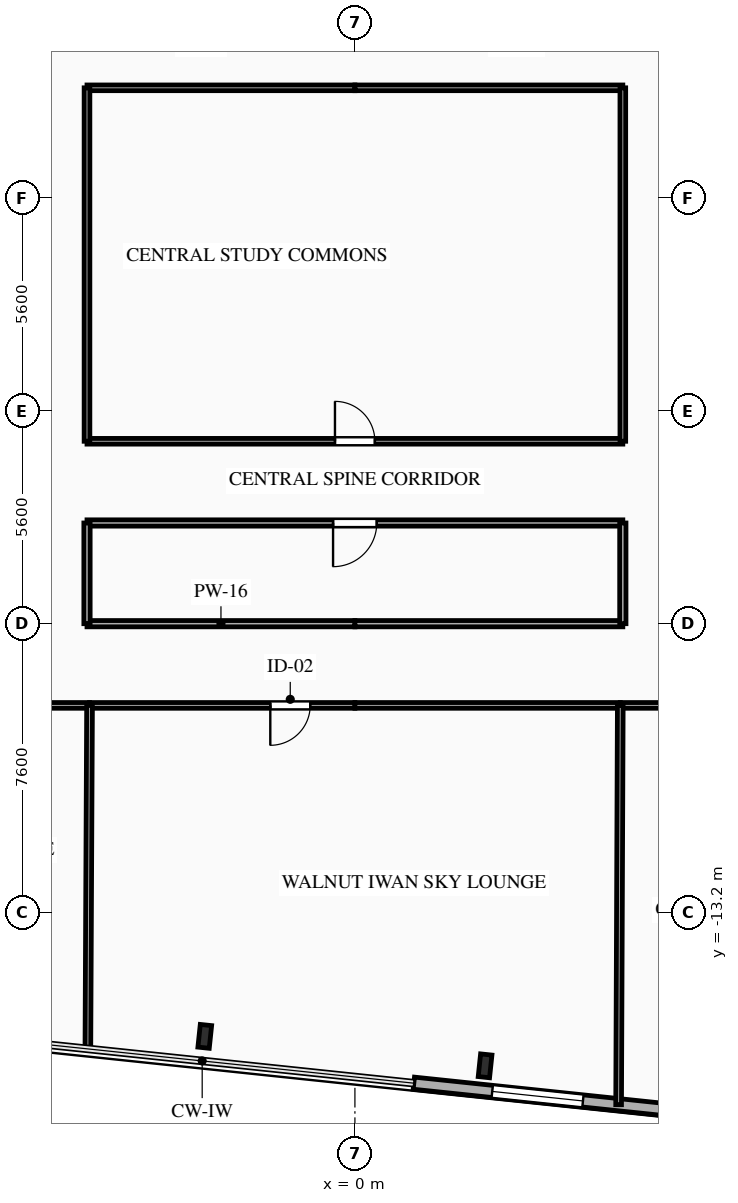
"""IFC4 building model, lengths in metres.
Left out: names, types, materials, properties, quantities, classifications, styles, units other than length and angle.
Written with IfcOpenShell. Run it as: python <this file> out.ifc"""

import sys

from ifc_helpers import new_model, si_unit, direction, frame, frame_2d, origin, origin_2d, place, context, subcontext, project, spatial, rectangle, i_section, extrude, element, fill, save


model = new_model("IFC4")
c1 = context("Model", 3, precision=1e-05, world=origin(), true_north=direction((0.0, 1.0)))
c2 = subcontext(c1, "Body", "Model", "MODEL_VIEW")
j1 = project(units=[si_unit("LENGTHUNIT", "METRE"), si_unit("PLANEANGLEUNIT", "RADIAN")], contexts=[c1])
p1 = place(None, origin())
s1 = spatial("IfcSite", under=j1, at=p1, CompositionType="ELEMENT")
p2 = place(p1, origin())
s2 = spatial("IfcBuilding", under=s1, at=p2, CompositionType="ELEMENT")
p3 = place(p2, frame((0.0, 0.0, 199.75)))
s3 = spatial("IfcBuildingStorey", under=s2, at=p3, CompositionType="ELEMENT", Elevation=199.75)
for number, where, z_axis, x_axis in (
    (1, (-3.951, -16.458, 0.0), (0.0, 0.0, 1.0), (0.995, -0.105, 0.0)),
    (2, (3.425, -17.233, 0.0), (0.0, 0.0, 1.0), (0.995, -0.105, 0.0)),
):
    element("IfcColumn", number, at=place(p3, frame(where, z_axis=z_axis, x_axis=x_axis)), inside=s3, PredefinedType="COLUMN", context=c2, shape_type="SweptSolid", body=[
        extrude(i_section(OverallWidth=0.3, OverallDepth=0.6, WebThickness=0.015, FlangeThickness=0.03, FilletRadius=0.027, at=origin_2d()), origin(), (0.0, 0.0, 1.0), 3.35),
    ])
p4 = place(p3, frame((18.756, -19.498, 0.0), z_axis=(0.0, 0.0, 1.0), x_axis=(-0.994523378108, 0.104514354977, 0.0)))
e3 = element("IfcWall", 3, at=p4, inside=s3, PredefinedType="SOLIDWALL", context=c2, shape_type="SweptSolid", body=[
    extrude(rectangle(XDim=17.3, YDim=0.32, at=frame_2d((8.65, 0.0))), origin(), (0.0, 0.0, 1.0), 3.04),
])
p5 = place(p4, frame((1.858, 0.0, 0.85)))
e4 = element("IfcOpeningElement", 4, at=p5, cuts=e3, PredefinedType="OPENING", context=c2, shape_type="SweptSolid", body=[
    extrude(rectangle(XDim=1.65, YDim=1.85, at=frame_2d((0.825, 0.925))), frame((0.0, 0.17, 0.0), z_axis=(0.0, -1.0, 0.0), x_axis=(1.0, 0.0, 0.0)), (0.0, 0.0, 1.0), 0.34),
])
p6 = place(p4, frame((8.26, 0.0, 0.85)))
e5 = element("IfcOpeningElement", 5, at=p6, cuts=e3, PredefinedType="OPENING", context=c2, shape_type="SweptSolid", body=[
    extrude(rectangle(XDim=1.65, YDim=1.85, at=frame_2d((0.825, 0.925))), frame((0.0, 0.17, 0.0), z_axis=(0.0, -1.0, 0.0), x_axis=(1.0, 0.0, 0.0)), (0.0, 0.0, 1.0), 0.34),
])
p7 = place(p4, frame((12.825, 0.0, 0.85)))
e6 = element("IfcOpeningElement", 6, at=p7, cuts=e3, PredefinedType="OPENING", context=c2, shape_type="SweptSolid", body=[
    extrude(rectangle(XDim=2.4, YDim=1.95, at=frame_2d((1.2, 0.975))), frame((0.0, 0.17, 0.0), z_axis=(0.0, -1.0, 0.0), x_axis=(1.0, 0.0, 0.0)), (0.0, 0.0, 1.0), 0.34),
])
for number, where, z_axis, x_axis in (
    (7, (0.0, 8.5, 0.0), (0.0, 0.0, 1.0), (-1.0, 0.0, 0.0)),
    (8, (7.05, 8.5, 0.0), (0.0, 0.0, 1.0), (-1.0, 0.0, 0.0)),
):
    element("IfcWall", number, at=place(p3, frame(where, z_axis=z_axis, x_axis=x_axis)), inside=s3, PredefinedType="PARTITIONING", context=c2, shape_type="SweptSolid", body=[
        extrude(rectangle(XDim=7.05, YDim=0.15, at=frame_2d((3.525, 0.0))), origin(), (0.0, 0.0, 1.0), 3.04),
    ])
p8 = place(p3, frame((-6.983, -7.75, 0.0), z_axis=(0.0, 0.0, 1.0), x_axis=(-1.0, 0.0, 0.0)))
e9 = element("IfcWall", 9, at=p8, inside=s3, PredefinedType="PARTITIONING", context=c2, shape_type="SweptSolid", body=[
    extrude(rectangle(XDim=13.967, YDim=0.15, at=frame_2d((6.983, 0.0))), origin(), (0.0, 0.0, 1.0), 3.04),
])
p9 = place(p8, frame((6.458, 0.0, 0.0)))
e10 = element("IfcOpeningElement", 10, at=p9, cuts=e9, PredefinedType="OPENING", context=c2, shape_type="SweptSolid", body=[
    extrude(rectangle(XDim=1.05, YDim=2.15, at=frame_2d((0.525, 1.075))), frame((0.0, 0.085, 0.0), z_axis=(0.0, -1.0, 0.0), x_axis=(1.0, 0.0, 0.0)), (0.0, 0.0, 1.0), 0.17),
])
p10 = place(p3, frame((0.0, -7.75, 0.0), z_axis=(0.0, 0.0, 1.0), x_axis=(-1.0, 0.0, 0.0)))
e11 = element("IfcWall", 11, at=p10, inside=s3, PredefinedType="PARTITIONING", context=c2, shape_type="SweptSolid", body=[
    extrude(rectangle(XDim=6.983, YDim=0.15, at=frame_2d((3.491, 0.0))), origin(), (0.0, 0.0, 1.0), 3.04),
])
p11 = place(p10, frame((1.177, 0.0, 0.0)))
e12 = element("IfcOpeningElement", 12, at=p11, cuts=e11, PredefinedType="OPENING", context=c2, shape_type="SweptSolid", body=[
    extrude(rectangle(XDim=1.05, YDim=2.15, at=frame_2d((0.525, 1.075))), frame((0.0, 0.085, 0.0), z_axis=(0.0, -1.0, 0.0), x_axis=(1.0, 0.0, 0.0)), (0.0, 0.0, 1.0), 0.17),
])
p12 = place(p3, frame((-7.05, -5.6, 0.0), z_axis=(0.0, 0.0, 1.0), x_axis=(1.0, 0.0, 0.0)))
e13 = element("IfcWall", 13, at=p12, inside=s3, PredefinedType="PARTITIONING", context=c2, shape_type="SweptSolid", body=[
    extrude(rectangle(XDim=7.05, YDim=0.165, at=frame_2d((3.525, 0.0))), origin(), (0.0, 0.0, 1.0), 2.525),
])
p13 = place(p3, frame((6.983, -7.75, 0.0), z_axis=(0.0, 0.0, 1.0), x_axis=(-1.0, 0.0, 0.0)))
e14 = element("IfcWall", 14, at=p13, inside=s3, PredefinedType="PARTITIONING", context=c2, shape_type="SweptSolid", body=[
    extrude(rectangle(XDim=6.983, YDim=0.15, at=frame_2d((3.491, 0.0))), origin(), (0.0, 0.0, 1.0), 3.04),
])
p14 = place(p3, frame((13.967, -7.75, 0.0), z_axis=(0.0, 0.0, 1.0), x_axis=(-1.0, 0.0, 0.0)))
e15 = element("IfcWall", 15, at=p14, inside=s3, PredefinedType="PARTITIONING", context=c2, shape_type="SweptSolid", body=[
    extrude(rectangle(XDim=6.984, YDim=0.15, at=frame_2d((3.492, 0.0))), origin(), (0.0, 0.0, 1.0), 3.04),
])
p15 = place(p14, frame((1.177, 0.0, 0.0)))
e16 = element("IfcOpeningElement", 16, at=p15, cuts=e15, PredefinedType="OPENING", context=c2, shape_type="SweptSolid", body=[
    extrude(rectangle(XDim=1.05, YDim=2.15, at=frame_2d((0.525, 1.075))), frame((0.0, 0.085, 0.0), z_axis=(0.0, -1.0, 0.0), x_axis=(1.0, 0.0, 0.0)), (0.0, 0.0, 1.0), 0.17),
])
p16 = place(p3, frame((0.0, -5.6, 0.0), z_axis=(0.0, 0.0, 1.0), x_axis=(1.0, 0.0, 0.0)))
e17 = element("IfcWall", 17, at=p16, inside=s3, PredefinedType="PARTITIONING", context=c2, shape_type="SweptSolid", body=[
    extrude(rectangle(XDim=7.05, YDim=0.165, at=frame_2d((3.525, 0.0))), origin(), (0.0, 0.0, 1.0), 2.525),
])
p17 = place(p3, frame((-7.05, -0.8, 0.0), z_axis=(0.0, 0.0, 1.0), x_axis=(1.0, 0.0, 0.0)))
e18 = element("IfcWall", 18, at=p17, inside=s3, PredefinedType="PARTITIONING", context=c2, shape_type="SweptSolid", body=[
    extrude(rectangle(XDim=14.1, YDim=0.15, at=frame_2d((7.05, 0.0))), origin(), (0.0, 0.0, 1.0), 3.04),
])
p18 = place(p17, frame((6.525, 0.0, 0.0)))
e19 = element("IfcOpeningElement", 19, at=p18, cuts=e18, PredefinedType="OPENING", context=c2, shape_type="SweptSolid", body=[
    extrude(rectangle(XDim=1.05, YDim=2.15, at=frame_2d((0.525, 1.075))), frame((0.0, 0.085, 0.0), z_axis=(0.0, -1.0, 0.0), x_axis=(1.0, 0.0, 0.0)), (0.0, 0.0, 1.0), 0.17),
])
p19 = place(p3, frame((7.05, -2.95, 0.0), z_axis=(0.0, 0.0, 1.0), x_axis=(-1.0, 0.0, 0.0)))
e20 = element("IfcWall", 20, at=p19, inside=s3, PredefinedType="PARTITIONING", context=c2, shape_type="SweptSolid", body=[
    extrude(rectangle(XDim=14.1, YDim=0.165, at=frame_2d((7.05, 0.0))), origin(), (0.0, 0.0, 1.0), 3.04),
])
p20 = place(p19, frame((6.475, 0.0, 0.0)))
e21 = element("IfcOpeningElement", 21, at=p20, cuts=e20, PredefinedType="OPENING", context=c2, shape_type="SweptSolid", body=[
    extrude(rectangle(XDim=1.15, YDim=2.15, at=frame_2d((0.575, 1.075))), frame((0.0, 0.093, 0.0), z_axis=(0.0, -1.0, 0.0), x_axis=(1.0, 0.0, 0.0)), (0.0, 0.0, 1.0), 0.185),
])
p21 = place(p3, frame((-7.05, 8.5, 0.0), z_axis=(0.0, 0.0, 1.0), x_axis=(0.0, -1.0, 0.0)))
e22 = element("IfcWall", 22, at=p21, inside=s3, PredefinedType="PARTITIONING", context=c2, shape_type="SweptSolid", body=[
    extrude(rectangle(XDim=9.3, YDim=0.15, at=frame_2d((4.65, 0.0))), origin(), (0.0, 0.0, 1.0), 3.04),
])
p22 = place(p3, frame((-7.05, -2.95, 0.0), z_axis=(0.0, 0.0, 1.0), x_axis=(0.0, -1.0, 0.0)))
e23 = element("IfcWall", 23, at=p22, inside=s3, PredefinedType="PARTITIONING", context=c2, shape_type="SweptSolid", body=[
    extrude(rectangle(XDim=2.65, YDim=0.165, at=frame_2d((1.325, 0.0))), origin(), (0.0, 0.0, 1.0), 3.04),
])
p23 = place(p3, frame((7.05, -0.8, 0.0), z_axis=(0.0, 0.0, 1.0), x_axis=(0.0, 1.0, 0.0)))
e24 = element("IfcWall", 24, at=p23, inside=s3, PredefinedType="PARTITIONING", context=c2, shape_type="SweptSolid", body=[
    extrude(rectangle(XDim=9.3, YDim=0.15, at=frame_2d((4.65, 0.0))), origin(), (0.0, 0.0, 1.0), 3.04),
])
p24 = place(p3, frame((7.05, -5.6, 0.0), z_axis=(0.0, 0.0, 1.0), x_axis=(0.0, 1.0, 0.0)))
e25 = element("IfcWall", 25, at=p24, inside=s3, PredefinedType="PARTITIONING", context=c2, shape_type="SweptSolid", body=[
    extrude(rectangle(XDim=2.65, YDim=0.165, at=frame_2d((1.325, 0.0))), origin(), (0.0, 0.0, 1.0), 3.04),
])
p25 = place(p3, frame((-6.983, -7.75, 0.0), z_axis=(0.0, 0.0, 1.0), x_axis=(-0.004861916497, -0.999988180814, 0.0)))
e26 = element("IfcWall", 26, at=p25, inside=s3, PredefinedType="PARTITIONING", context=c2, shape_type="SweptSolid", body=[
    extrude(rectangle(XDim=9.039, YDim=0.15, at=frame_2d((4.519, 0.0))), origin(), (0.0, 0.0, 1.0), 3.04),
])
p26 = place(p3, frame((6.983, -7.75, 0.0), z_axis=(0.0, 0.0, 1.0), x_axis=(-0.004159465807, -0.999991349385, 0.0)))
e27 = element("IfcWall", 27, at=p26, inside=s3, PredefinedType="PARTITIONING", context=c2, shape_type="SweptSolid", body=[
    extrude(rectangle(XDim=10.506, YDim=0.15, at=frame_2d((5.253, 0.0))), origin(), (0.0, 0.0, 1.0), 3.04),
])
p27 = place(p7, origin())
e28 = element("IfcWindow", 28, at=p27, inside=s3, PartitioningType="SINGLE_PANEL", PredefinedType="WINDOW", context=c2, shape_type="SweptSolid", body=[
    extrude(rectangle(XDim=2.4, YDim=1.95, at=frame_2d((1.2, 0.975))), frame((0.0, 0.03, 0.0), z_axis=(0.0, -1.0, 0.0), x_axis=(1.0, 0.0, 0.0)), (0.0, 0.0, 1.0), 0.06),
])
fill(e6, e28)
p28 = place(p11, origin())
e29 = element("IfcDoor", 29, at=p28, inside=s3, OperationType="SINGLE_SWING_RIGHT", PredefinedType="DOOR", context=c2, shape_type="SweptSolid", body=[
    extrude(rectangle(XDim=1.05, YDim=2.15, at=frame_2d((0.525, 1.075))), frame((0.0, 0.025, 0.0), z_axis=(0.0, -1.0, 0.0), x_axis=(1.0, 0.0, 0.0)), (0.0, 0.0, 1.0), 0.05),
])
fill(e12, e29)
p29 = place(p18, origin())
e30 = element("IfcDoor", 30, at=p29, inside=s3, OperationType="SINGLE_SWING_LEFT", PredefinedType="DOOR", context=c2, shape_type="SweptSolid", body=[
    extrude(rectangle(XDim=1.05, YDim=2.15, at=frame_2d((0.525, 1.075))), frame((0.0, 0.025, 0.0), z_axis=(0.0, -1.0, 0.0), x_axis=(1.0, 0.0, 0.0)), (0.0, 0.0, 1.0), 0.05),
])
fill(e19, e30)
p30 = place(p20, origin())
e31 = element("IfcDoor", 31, at=p30, inside=s3, OperationType="SINGLE_SWING_RIGHT", PredefinedType="DOOR", context=c2, shape_type="SweptSolid", body=[
    extrude(rectangle(XDim=1.15, YDim=2.15, at=frame_2d((0.575, 1.075))), frame((0.0, 0.025, 0.0), z_axis=(0.0, -1.0, 0.0), x_axis=(1.0, 0.0, 0.0)), (0.0, 0.0, 1.0), 0.05),
])
fill(e21, e31)
save(model, sys.argv[1])
